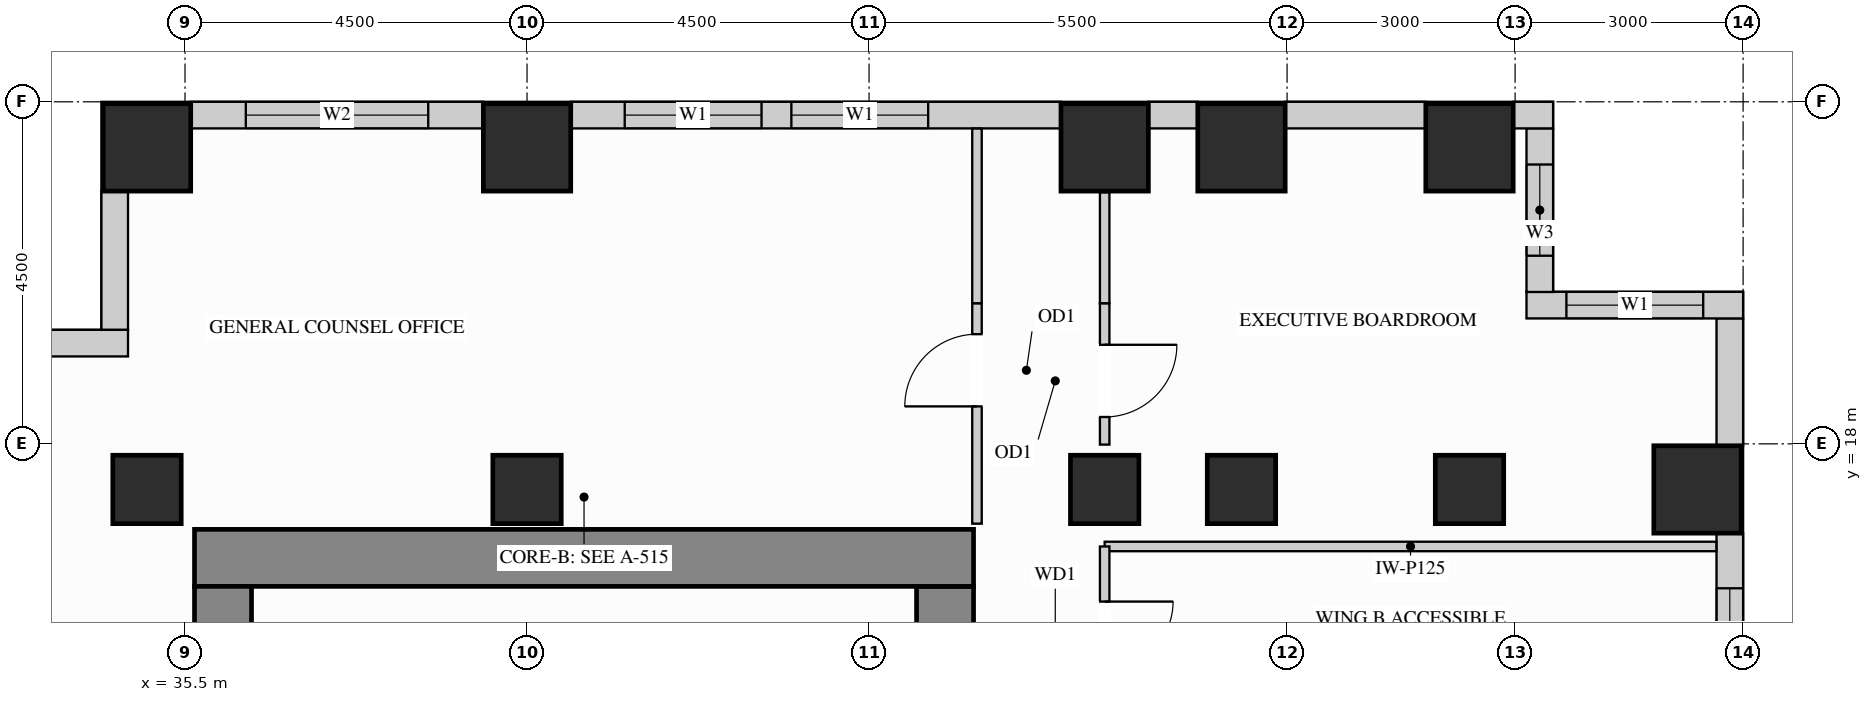
"""IFC4 building model, lengths in metres.
Left out: names, types, materials, properties, quantities, classifications, styles, units other than length and angle.
Written with IfcOpenShell. Run it as: python <this file> out.ifc"""

import sys

from ifc_helpers import new_model, si_unit, direction, frame, frame_2d, origin, origin_2d, place, context, subcontext, project, spatial, rectangle, extrude, source, transform, mapped, element, fill, save


model = new_model("IFC4")
c1 = context("Model", 3, precision=1e-05, world=origin(), true_north=direction((0.0, 1.0)))
c2 = subcontext(c1, "Body", "Model", "MODEL_VIEW")
j1 = project(units=[si_unit("LENGTHUNIT", "METRE"), si_unit("PLANEANGLEUNIT", "RADIAN")], contexts=[c1])
p1 = place(None, origin())
s1 = spatial("IfcSite", under=j1, at=p1, CompositionType="ELEMENT")
p2 = place(p1, origin())
s2 = spatial("IfcBuilding", under=s1, at=p2, CompositionType="ELEMENT")
p3 = place(p2, frame((0.0, 0.0, 113.4)))
s3 = spatial("IfcBuildingStorey", under=s2, at=p3, CompositionType="ELEMENT", Elevation=113.4)
m1 = source(origin(), c2, "Body", "SweptSolid", [
    extrude(rectangle(XDim=0.9, YDim=0.9, at=origin_2d()), origin(), (0.0, 0.0, 1.0), 3.38),
])
for number, where, z_axis, x_axis in (
    (1, (35.0, 17.4, 0.0), (0.0, 0.0, 1.0), (1.0, 0.0, 0.0)),
    (2, (40.0, 17.4, 0.0), (0.0, 0.0, 1.0), (1.0, 0.0, 0.0)),
    (3, (47.6, 17.4, 0.0), (0.0, 0.0, 1.0), (1.0, 0.0, 0.0)),
    (4, (49.4, 17.4, 0.0), (0.0, 0.0, 1.0), (1.0, 0.0, 0.0)),
    (5, (52.4, 17.4, 0.0), (0.0, 0.0, 1.0), (1.0, 0.0, 0.0)),
):
    element("IfcColumn", number, at=place(p3, frame(where, z_axis=z_axis, x_axis=x_axis)), inside=s3, PredefinedType="COLUMN", context=c2, shape_type="MappedRepresentation", body=[
        mapped(m1, transform((0.0, 0.0, 0.0), x_axis=(1.0, 0.0, 0.0), y_axis=(0.0, 1.0, 0.0), z_axis=(0.0, 0.0, 1.0))),
    ])
m2 = source(origin(), c2, "Body", "SweptSolid", [
    extrude(rectangle(XDim=1.15, YDim=1.15, at=origin_2d()), origin(), (0.0, 0.0, 1.0), 3.38),
])
for number, where, z_axis, x_axis in (
    (6, (35.0, 21.9, 0.0), (0.0, 0.0, 1.0), (1.0, 0.0, 0.0)),
    (7, (40.0, 21.9, 0.0), (0.0, 0.0, 1.0), (1.0, 0.0, 0.0)),
    (8, (47.6, 21.9, 0.0), (0.0, 0.0, 1.0), (1.0, 0.0, 0.0)),
    (9, (49.4, 21.9, 0.0), (0.0, 0.0, 1.0), (1.0, 0.0, 0.0)),
    (10, (52.4, 21.9, 0.0), (0.0, 0.0, 1.0), (1.0, 0.0, 0.0)),
    (11, (55.4, 17.4, 0.0), (0.0, 0.0, 1.0), (1.0, 0.0, 0.0)),
):
    element("IfcColumn", number, at=place(p3, frame(where, z_axis=z_axis, x_axis=x_axis)), inside=s3, PredefinedType="COLUMN", context=c2, shape_type="MappedRepresentation", body=[
        mapped(m2, transform((0.0, 0.0, 0.0), x_axis=(1.0, 0.0, 0.0), y_axis=(0.0, 1.0, 0.0), z_axis=(0.0, 0.0, 1.0))),
    ])
m3 = source(origin(), c2, "Body", "SweptSolid", [
    extrude(rectangle(XDim=3.725, YDim=0.75, at=frame_2d((1.863, 0.0))), origin(), (0.0, 0.0, 1.0), 3.38),
])
p4 = place(p3, frame((45.5, 12.4, 0.0), z_axis=(0.0, 0.0, 1.0), x_axis=(0.0, 1.0, 0.0)))
e12 = element("IfcWall", 12, at=p4, inside=s3, PredefinedType="SHEAR", context=c2, shape_type="MappedRepresentation", body=[
    mapped(m3, transform((0.0, 0.0, 0.0), x_axis=(1.0, 0.0, 0.0), y_axis=(0.0, 1.0, 0.0), z_axis=(0.0, 0.0, 1.0))),
])
m4 = source(origin(), c2, "Body", "SweptSolid", [
    extrude(rectangle(XDim=10.25, YDim=0.75, at=frame_2d((5.125, 0.0))), origin(), (0.0, 0.0, 1.0), 3.38),
])
p5 = place(p3, frame((35.625, 16.5, 0.0), z_axis=(0.0, 0.0, 1.0), x_axis=(1.0, 0.0, 0.0)))
e13 = element("IfcWall", 13, at=p5, inside=s3, PredefinedType="SHEAR", context=c2, shape_type="MappedRepresentation", body=[
    mapped(m4, transform((0.0, 0.0, 0.0), x_axis=(1.0, 0.0, 0.0), y_axis=(0.0, 1.0, 0.0), z_axis=(0.0, 0.0, 1.0))),
])
p6 = place(p3, frame((36.0, 12.4, 0.0), z_axis=(0.0, 0.0, 1.0), x_axis=(0.0, 1.0, 0.0)))
e14 = element("IfcWall", 14, at=p6, inside=s3, PredefinedType="SHEAR", context=c2, shape_type="MappedRepresentation", body=[
    mapped(m3, transform((0.0, 0.0, 0.0), x_axis=(1.0, 0.0, 0.0), y_axis=(0.0, 1.0, 0.0), z_axis=(0.0, 0.0, 1.0))),
])
p7 = place(p3, frame((55.825, 14.073, 0.0), z_axis=(0.0, 0.0, 1.0), x_axis=(0.0, 1.0, 0.0)))
e15 = element("IfcWall", 15, at=p7, inside=s3, PredefinedType="SOLIDWALL", context=c2, shape_type="SweptSolid", body=[
    extrude(rectangle(XDim=2.754, YDim=0.35, at=frame_2d((1.377, 0.0))), origin(), (0.0, 0.0, 1.0), 3.365),
])
p8 = place(p7, frame((0.827, 0.0, 0.78)))
e16 = element("IfcOpeningElement", 16, at=p8, cuts=e15, PredefinedType="OPENING", context=c2, shape_type="SweptSolid", body=[
    extrude(rectangle(XDim=1.2, YDim=2.1, at=frame_2d((0.6, 1.05))), frame((0.0, 0.185, 0.0), z_axis=(0.0, -1.0, 0.0), x_axis=(1.0, 0.0, 0.0)), (0.0, 0.0, 1.0), 0.37),
])
m5 = source(origin(), c2, "Body", "SweptSolid", [
    extrude(rectangle(XDim=1.679, YDim=0.35, at=frame_2d((0.84, 0.0))), origin(), (0.0, 0.0, 1.0), 3.365),
])
p9 = place(p3, frame((55.825, 17.973, 0.0), z_axis=(0.0, 0.0, 1.0), x_axis=(0.0, 1.0, 0.0)))
e17 = element("IfcWall", 17, at=p9, inside=s3, PredefinedType="SOLIDWALL", context=c2, shape_type="MappedRepresentation", body=[
    mapped(m5, transform((0.0, 0.0, 0.0), x_axis=(1.0, 0.0, 0.0), y_axis=(0.0, 1.0, 0.0), z_axis=(0.0, 0.0, 1.0))),
])
p10 = place(p3, frame((56.0, 19.825, 0.0), z_axis=(0.0, 0.0, 1.0), x_axis=(-1.0, 0.0, 0.0)))
e18 = element("IfcWall", 18, at=p10, inside=s3, PredefinedType="SOLIDWALL", context=c2, shape_type="SweptSolid", body=[
    extrude(rectangle(XDim=2.85, YDim=0.35, at=frame_2d((1.425, 0.0))), origin(), (0.0, 0.0, 1.0), 3.365),
])
p11 = place(p10, frame((0.525, 0.0, 0.78)))
e19 = element("IfcOpeningElement", 19, at=p11, cuts=e18, PredefinedType="OPENING", context=c2, shape_type="SweptSolid", body=[
    extrude(rectangle(XDim=1.8, YDim=2.1, at=frame_2d((0.9, 1.05))), frame((0.0, 0.185, 0.0), z_axis=(0.0, -1.0, 0.0), x_axis=(1.0, 0.0, 0.0)), (0.0, 0.0, 1.0), 0.37),
])
p12 = place(p3, frame((53.325, 19.998, 0.0), z_axis=(0.0, 0.0, 1.0), x_axis=(0.0, 1.0, 0.0)))
e20 = element("IfcWall", 20, at=p12, inside=s3, PredefinedType="SOLIDWALL", context=c2, shape_type="SweptSolid", body=[
    extrude(rectangle(XDim=2.154, YDim=0.35, at=frame_2d((1.077, 0.0))), origin(), (0.0, 0.0, 1.0), 3.365),
])
p13 = place(p12, frame((0.477, 0.0, 0.78)))
e21 = element("IfcOpeningElement", 21, at=p13, cuts=e20, PredefinedType="OPENING", context=c2, shape_type="SweptSolid", body=[
    extrude(rectangle(XDim=1.2, YDim=2.1, at=frame_2d((0.6, 1.05))), frame((0.0, 0.185, 0.0), z_axis=(0.0, -1.0, 0.0), x_axis=(1.0, 0.0, 0.0)), (0.0, 0.0, 1.0), 0.37),
])
m6 = source(origin(), c2, "Body", "SweptSolid", [
    extrude(rectangle(XDim=0.527, YDim=0.35, at=frame_2d((0.264, 0.0))), origin(), (0.0, 0.0, 1.0), 3.365),
])
p14 = place(p3, frame((53.5, 22.325, 0.0), z_axis=(0.0, 0.0, 1.0), x_axis=(-1.0, 0.0, 0.0)))
e22 = element("IfcWall", 22, at=p14, inside=s3, PredefinedType="SOLIDWALL", context=c2, shape_type="MappedRepresentation", body=[
    mapped(m6, transform((0.0, 0.0, 0.0), x_axis=(1.0, 0.0, 0.0), y_axis=(0.0, 1.0, 0.0), z_axis=(0.0, 0.0, 1.0))),
])
m7 = source(origin(), c2, "Body", "SweptSolid", [
    extrude(rectangle(XDim=1.854, YDim=0.35, at=frame_2d((0.927, 0.0))), origin(), (0.0, 0.0, 1.0), 3.365),
])
p15 = place(p3, frame((51.827, 22.325, 0.0), z_axis=(0.0, 0.0, 1.0), x_axis=(-1.0, 0.0, 0.0)))
e23 = element("IfcWall", 23, at=p15, inside=s3, PredefinedType="SOLIDWALL", context=c2, shape_type="MappedRepresentation", body=[
    mapped(m7, transform((0.0, 0.0, 0.0), x_axis=(1.0, 0.0, 0.0), y_axis=(0.0, 1.0, 0.0), z_axis=(0.0, 0.0, 1.0))),
])
m8 = source(origin(), c2, "Body", "SweptSolid", [
    extrude(rectangle(XDim=0.654, YDim=0.35, at=frame_2d((0.327, 0.0))), origin(), (0.0, 0.0, 1.0), 3.365),
])
p16 = place(p3, frame((48.827, 22.325, 0.0), z_axis=(0.0, 0.0, 1.0), x_axis=(-1.0, 0.0, 0.0)))
e24 = element("IfcWall", 24, at=p16, inside=s3, PredefinedType="SOLIDWALL", context=c2, shape_type="MappedRepresentation", body=[
    mapped(m8, transform((0.0, 0.0, 0.0), x_axis=(1.0, 0.0, 0.0), y_axis=(0.0, 1.0, 0.0), z_axis=(0.0, 0.0, 1.0))),
])
p17 = place(p3, frame((47.027, 22.325, 0.0), z_axis=(0.0, 0.0, 1.0), x_axis=(-1.0, 0.0, 0.0)))
e25 = element("IfcWall", 25, at=p17, inside=s3, PredefinedType="SOLIDWALL", context=c2, shape_type="SweptSolid", body=[
    extrude(rectangle(XDim=6.454, YDim=0.35, at=frame_2d((3.227, 0.0))), origin(), (0.0, 0.0, 1.0), 3.365),
])
p18 = place(p17, frame((1.749, 0.0, 0.78)))
e26 = element("IfcOpeningElement", 26, at=p18, cuts=e25, PredefinedType="OPENING", context=c2, shape_type="SweptSolid", body=[
    extrude(rectangle(XDim=1.8, YDim=2.1, at=frame_2d((0.9, 1.05))), frame((0.0, 0.185, 0.0), z_axis=(0.0, -1.0, 0.0), x_axis=(1.0, 0.0, 0.0)), (0.0, 0.0, 1.0), 0.37),
])
p19 = place(p17, frame((3.942, 0.0, 0.78)))
e27 = element("IfcOpeningElement", 27, at=p19, cuts=e25, PredefinedType="OPENING", context=c2, shape_type="SweptSolid", body=[
    extrude(rectangle(XDim=1.8, YDim=2.1, at=frame_2d((0.9, 1.05))), frame((0.0, 0.185, 0.0), z_axis=(0.0, -1.0, 0.0), x_axis=(1.0, 0.0, 0.0)), (0.0, 0.0, 1.0), 0.37),
])
p20 = place(p3, frame((39.427, 22.325, 0.0), z_axis=(0.0, 0.0, 1.0), x_axis=(-1.0, 0.0, 0.0)))
e28 = element("IfcWall", 28, at=p20, inside=s3, PredefinedType="SOLIDWALL", context=c2, shape_type="SweptSolid", body=[
    extrude(rectangle(XDim=3.854, YDim=0.35, at=frame_2d((1.927, 0.0))), origin(), (0.0, 0.0, 1.0), 3.365),
])
p21 = place(p20, frame((0.727, 0.0, 0.78)))
e29 = element("IfcOpeningElement", 29, at=p21, cuts=e28, PredefinedType="OPENING", context=c2, shape_type="SweptSolid", body=[
    extrude(rectangle(XDim=2.4, YDim=2.1, at=frame_2d((1.2, 1.05))), frame((0.0, 0.185, 0.0), z_axis=(0.0, -1.0, 0.0), x_axis=(1.0, 0.0, 0.0)), (0.0, 0.0, 1.0), 0.37),
])
m9 = source(origin(), c2, "Body", "SweptSolid", [
    extrude(rectangle(XDim=1.829, YDim=0.35, at=frame_2d((0.915, 0.0))), origin(), (0.0, 0.0, 1.0), 3.365),
])
p22 = place(p3, frame((34.575, 21.327, 0.0), z_axis=(0.0, 0.0, 1.0), x_axis=(0.0, -1.0, 0.0)))
e30 = element("IfcWall", 30, at=p22, inside=s3, PredefinedType="SOLIDWALL", context=c2, shape_type="MappedRepresentation", body=[
    mapped(m9, transform((0.0, 0.0, 0.0), x_axis=(1.0, 0.0, 0.0), y_axis=(0.0, 1.0, 0.0), z_axis=(0.0, 0.0, 1.0))),
])
p23 = place(p3, frame((34.75, 19.325, 0.0), z_axis=(0.0, 0.0, 1.0), x_axis=(-1.0, 0.0, 0.0)))
e31 = element("IfcWall", 31, at=p23, inside=s3, PredefinedType="SOLIDWALL", context=c2, shape_type="SweptSolid", body=[
    extrude(rectangle(XDim=15.6, YDim=0.35, at=frame_2d((7.8, 0.0))), origin(), (0.0, 0.0, 1.0), 3.365),
])
p24 = place(p23, frame((4.307, 0.0, 0.78)))
e32 = element("IfcOpeningElement", 32, at=p24, cuts=e31, PredefinedType="OPENING", context=c2, shape_type="SweptSolid", body=[
    extrude(rectangle(XDim=1.5, YDim=2.0, at=frame_2d((0.75, 1.0))), frame((0.0, 0.185, 0.0), z_axis=(0.0, -1.0, 0.0), x_axis=(1.0, 0.0, 0.0)), (0.0, 0.0, 1.0), 0.37),
])
p25 = place(p23, frame((9.793, 0.0, 0.78)))
e33 = element("IfcOpeningElement", 33, at=p25, cuts=e31, PredefinedType="OPENING", context=c2, shape_type="SweptSolid", body=[
    extrude(rectangle(XDim=1.5, YDim=2.0, at=frame_2d((0.75, 1.0))), frame((0.0, 0.185, 0.0), z_axis=(0.0, -1.0, 0.0), x_axis=(1.0, 0.0, 0.0)), (0.0, 0.0, 1.0), 0.37),
])
m10 = source(origin(), c2, "Body", "SweptSolid", [
    extrude(rectangle(XDim=8.048, YDim=0.125, at=frame_2d((4.024, 0.0))), origin(), (0.0, 0.0, 1.0), 2.677),
])
p26 = place(p3, frame((47.6, 16.65, 0.0), z_axis=(0.0, 0.0, 1.0), x_axis=(1.0, 0.0, 0.0)))
e34 = element("IfcWall", 34, at=p26, inside=s3, PredefinedType="PARTITIONING", context=c2, shape_type="MappedRepresentation", body=[
    mapped(m10, transform((0.0, 0.0, 0.0), x_axis=(1.0, 0.0, 0.0), y_axis=(0.0, 1.0, 0.0), z_axis=(0.0, 0.0, 1.0))),
])
p27 = place(p3, frame((47.6, 17.99, 0.0), z_axis=(0.0, 0.0, 1.0), x_axis=(0.0, 1.0, 0.0)))
e35 = element("IfcWall", 35, at=p27, inside=s3, PredefinedType="PARTITIONING", context=c2, shape_type="SweptSolid", body=[
    extrude(rectangle(XDim=1.86, YDim=0.125, at=frame_2d((0.93, 0.0))), origin(), (0.0, 0.0, 1.0), 2.677),
])
p28 = place(p27, frame((0.363, 0.0, 0.0)))
e36 = element("IfcOpeningElement", 36, at=p28, cuts=e35, PredefinedType="OPENING", context=c2, shape_type="SweptSolid", body=[
    extrude(rectangle(XDim=0.95, YDim=2.15, at=frame_2d((0.475, 1.075))), frame((0.0, 0.073, 0.0), z_axis=(0.0, -1.0, 0.0), x_axis=(1.0, 0.0, 0.0)), (0.0, 0.0, 1.0), 0.145),
])
m11 = source(origin(), c2, "Body", "SweptSolid", [
    extrude(rectangle(XDim=1.46, YDim=0.125, at=frame_2d((0.73, 0.0))), origin(), (0.0, 0.0, 1.0), 2.677),
])
p29 = place(p3, frame((47.6, 19.85, 0.0), z_axis=(0.0, 0.0, 1.0), x_axis=(0.0, 1.0, 0.0)))
e37 = element("IfcWall", 37, at=p29, inside=s3, PredefinedType="PARTITIONING", context=c2, shape_type="MappedRepresentation", body=[
    mapped(m11, transform((0.0, 0.0, 0.0), x_axis=(1.0, 0.0, 0.0), y_axis=(0.0, 1.0, 0.0), z_axis=(0.0, 0.0, 1.0))),
])
p30 = place(p3, frame((47.6, 14.35, 0.0), z_axis=(0.0, 0.0, 1.0), x_axis=(0.0, 1.0, 0.0)))
e38 = element("IfcWall", 38, at=p30, inside=s3, PredefinedType="PARTITIONING", context=c2, shape_type="SweptSolid", body=[
    extrude(rectangle(XDim=2.3, YDim=0.125, at=frame_2d((1.15, 0.0))), origin(), (0.0, 0.0, 1.0), 2.677),
])
p31 = place(p30, frame((0.675, 0.0, 0.0)))
e39 = element("IfcOpeningElement", 39, at=p31, cuts=e38, PredefinedType="OPENING", context=c2, shape_type="SweptSolid", body=[
    extrude(rectangle(XDim=0.9, YDim=2.15, at=frame_2d((0.45, 1.075))), frame((0.0, 0.073, 0.0), z_axis=(0.0, -1.0, 0.0), x_axis=(1.0, 0.0, 0.0)), (0.0, 0.0, 1.0), 0.145),
])
p32 = place(p3, frame((45.92, 16.95, 0.0), z_axis=(0.0, 0.0, 1.0), x_axis=(0.0, 1.0, 0.0)))
e40 = element("IfcWall", 40, at=p32, inside=s3, PredefinedType="PARTITIONING", context=c2, shape_type="SweptSolid", body=[
    extrude(rectangle(XDim=2.9, YDim=0.125, at=frame_2d((1.45, 0.0))), origin(), (0.0, 0.0, 1.0), 3.365),
])
p33 = place(p32, frame((1.543, 0.0, 0.0)))
e41 = element("IfcOpeningElement", 41, at=p33, cuts=e40, PredefinedType="OPENING", context=c2, shape_type="SweptSolid", body=[
    extrude(rectangle(XDim=0.95, YDim=2.15, at=frame_2d((0.475, 1.075))), frame((0.0, 0.073, 0.0), z_axis=(0.0, -1.0, 0.0), x_axis=(1.0, 0.0, 0.0)), (0.0, 0.0, 1.0), 0.145),
])
m12 = source(origin(), c2, "Body", "SweptSolid", [
    extrude(rectangle(XDim=2.298, YDim=0.125, at=frame_2d((1.149, 0.0))), origin(), (0.0, 0.0, 1.0), 3.365),
])
p34 = place(p3, frame((45.92, 19.85, 0.0), z_axis=(0.0, 0.0, 1.0), x_axis=(0.0, 1.0, 0.0)))
e42 = element("IfcWall", 42, at=p34, inside=s3, PredefinedType="PARTITIONING", context=c2, shape_type="MappedRepresentation", body=[
    mapped(m12, transform((0.0, 0.0, 0.0), x_axis=(1.0, 0.0, 0.0), y_axis=(0.0, 1.0, 0.0), z_axis=(0.0, 0.0, 1.0))),
])
m13 = source(origin(), c2, "Body", "SweptSolid", [
    extrude(rectangle(XDim=0.95, YDim=2.15, at=frame_2d((0.475, 1.075))), frame((0.0, 0.025, 0.0), z_axis=(0.0, -1.0, 0.0), x_axis=(1.0, 0.0, 0.0)), (0.0, 0.0, 1.0), 0.05),
])
p35 = place(p33, origin())
e43 = element("IfcDoor", 43, at=p35, inside=s3, OperationType="SINGLE_SWING_LEFT", PredefinedType="DOOR", context=c2, shape_type="MappedRepresentation", body=[
    mapped(m13, transform((0.0, 0.0, 0.0), x_axis=(1.0, 0.0, 0.0), y_axis=(0.0, 1.0, 0.0), z_axis=(0.0, 0.0, 1.0))),
])
fill(e41, e43)
p36 = place(p28, origin())
e44 = element("IfcDoor", 44, at=p36, inside=s3, OperationType="SINGLE_SWING_RIGHT", PredefinedType="DOOR", context=c2, shape_type="MappedRepresentation", body=[
    mapped(m13, transform((0.0, 0.0, 0.0), x_axis=(1.0, 0.0, 0.0), y_axis=(0.0, 1.0, 0.0), z_axis=(0.0, 0.0, 1.0))),
])
fill(e36, e44)
m14 = source(origin(), c2, "Body", "SweptSolid", [
    extrude(rectangle(XDim=0.9, YDim=2.15, at=frame_2d((0.45, 1.075))), frame((0.0, 0.025, 0.0), z_axis=(0.0, -1.0, 0.0), x_axis=(1.0, 0.0, 0.0)), (0.0, 0.0, 1.0), 0.05),
])
p37 = place(p31, origin())
e45 = element("IfcDoor", 45, at=p37, inside=s3, OperationType="SINGLE_SWING_RIGHT", PredefinedType="DOOR", context=c2, shape_type="MappedRepresentation", body=[
    mapped(m14, transform((0.0, 0.0, 0.0), x_axis=(1.0, 0.0, 0.0), y_axis=(0.0, 1.0, 0.0), z_axis=(0.0, 0.0, 1.0))),
])
fill(e39, e45)
m15 = source(origin(), c2, "Body", "SweptSolid", [
    extrude(rectangle(XDim=1.8, YDim=2.1, at=frame_2d((0.9, 1.05))), frame((0.0, 0.03, 0.0), z_axis=(0.0, -1.0, 0.0), x_axis=(1.0, 0.0, 0.0)), (0.0, 0.0, 1.0), 0.06),
])
p38 = place(p11, origin())
e46 = element("IfcWindow", 46, at=p38, inside=s3, PartitioningType="SINGLE_PANEL", PredefinedType="WINDOW", context=c2, shape_type="MappedRepresentation", body=[
    mapped(m15, transform((0.0, 0.0, 0.0), x_axis=(1.0, 0.0, 0.0), y_axis=(0.0, 1.0, 0.0), z_axis=(0.0, 0.0, 1.0))),
])
fill(e19, e46)
p39 = place(p18, origin())
e47 = element("IfcWindow", 47, at=p39, inside=s3, PartitioningType="SINGLE_PANEL", PredefinedType="WINDOW", context=c2, shape_type="MappedRepresentation", body=[
    mapped(m15, transform((0.0, 0.0, 0.0), x_axis=(1.0, 0.0, 0.0), y_axis=(0.0, 1.0, 0.0), z_axis=(0.0, 0.0, 1.0))),
])
fill(e26, e47)
p40 = place(p19, origin())
e48 = element("IfcWindow", 48, at=p40, inside=s3, PartitioningType="SINGLE_PANEL", PredefinedType="WINDOW", context=c2, shape_type="MappedRepresentation", body=[
    mapped(m15, transform((0.0, 0.0, 0.0), x_axis=(1.0, 0.0, 0.0), y_axis=(0.0, 1.0, 0.0), z_axis=(0.0, 0.0, 1.0))),
])
fill(e27, e48)
m16 = source(origin(), c2, "Body", "SweptSolid", [
    extrude(rectangle(XDim=2.4, YDim=2.1, at=frame_2d((1.2, 1.05))), frame((0.0, 0.03, 0.0), z_axis=(0.0, -1.0, 0.0), x_axis=(1.0, 0.0, 0.0)), (0.0, 0.0, 1.0), 0.06),
])
p41 = place(p21, origin())
e49 = element("IfcWindow", 49, at=p41, inside=s3, PartitioningType="SINGLE_PANEL", PredefinedType="WINDOW", context=c2, shape_type="MappedRepresentation", body=[
    mapped(m16, transform((0.0, 0.0, 0.0), x_axis=(1.0, 0.0, 0.0), y_axis=(0.0, 1.0, 0.0), z_axis=(0.0, 0.0, 1.0))),
])
fill(e29, e49)
m17 = source(origin(), c2, "Body", "SweptSolid", [
    extrude(rectangle(XDim=1.2, YDim=2.1, at=frame_2d((0.6, 1.05))), frame((0.0, 0.03, 0.0), z_axis=(0.0, -1.0, 0.0), x_axis=(1.0, 0.0, 0.0)), (0.0, 0.0, 1.0), 0.06),
])
p42 = place(p8, origin())
e50 = element("IfcWindow", 50, at=p42, inside=s3, PartitioningType="SINGLE_PANEL", PredefinedType="WINDOW", context=c2, shape_type="MappedRepresentation", body=[
    mapped(m17, transform((0.0, 0.0, 0.0), x_axis=(1.0, 0.0, 0.0), y_axis=(0.0, 1.0, 0.0), z_axis=(0.0, 0.0, 1.0))),
])
fill(e16, e50)
p43 = place(p13, origin())
e51 = element("IfcWindow", 51, at=p43, inside=s3, PartitioningType="SINGLE_PANEL", PredefinedType="WINDOW", context=c2, shape_type="MappedRepresentation", body=[
    mapped(m17, transform((0.0, 0.0, 0.0), x_axis=(1.0, 0.0, 0.0), y_axis=(0.0, 1.0, 0.0), z_axis=(0.0, 0.0, 1.0))),
])
fill(e21, e51)
save(model, sys.argv[1])
